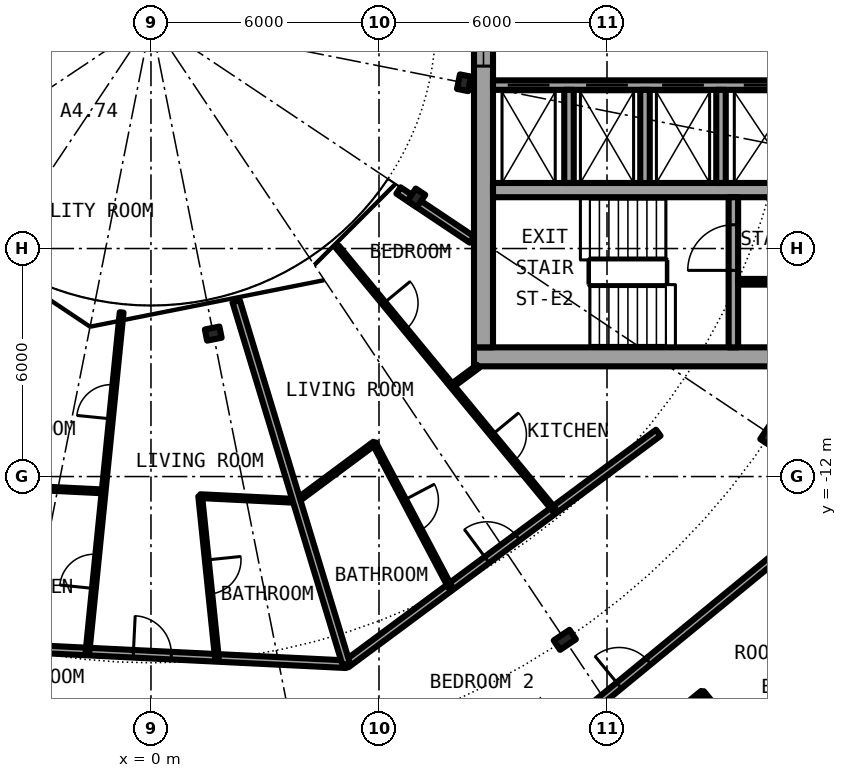
"""IFC4 building model, lengths in metres.
Left out: names, types, materials, properties, quantities, classifications, styles, units other than length and angle.
Written with IfcOpenShell. Run it as: python <this file> out.ifc"""

import sys

from ifc_helpers import new_model, si_unit, direction, frame, frame_2d, origin, origin_2d, place, context, subcontext, project, spatial, rectangle, i_section, extrude, element, fill, save


model = new_model("IFC4")
c1 = context("Model", 3, precision=1e-05, world=origin(), true_north=direction((0.0, 1.0)))
c2 = subcontext(c1, "Body", "Model", "MODEL_VIEW")
j1 = project(units=[si_unit("LENGTHUNIT", "METRE"), si_unit("PLANEANGLEUNIT", "RADIAN")], contexts=[c1])
p1 = place(None, origin())
s1 = spatial("IfcSite", under=j1, at=p1, CompositionType="ELEMENT")
p2 = place(p1, origin())
s2 = spatial("IfcBuilding", under=s1, at=p2, CompositionType="ELEMENT")
p3 = place(p2, frame((0.0, 0.0, 151.3)))
s3 = spatial("IfcBuildingStorey", under=s2, at=p3, CompositionType="ELEMENT", Elevation=151.3)
for number, where, z_axis, x_axis in (
    (1, (10.889, -16.297, 0.0), (0.0, 0.0, 1.0), (0.556, -0.831, 0.0)),
    (2, (16.297, -10.889, 0.0), (0.0, 0.0, 1.0), (0.831, -0.556, 0.0)),
):
    element("IfcColumn", number, at=place(p3, frame(where, z_axis=z_axis, x_axis=x_axis)), inside=s3, PredefinedType="COLUMN", context=c2, shape_type="SweptSolid", body=[
        extrude(i_section(OverallWidth=0.3, OverallDepth=0.5, WebThickness=0.014, FlangeThickness=0.028, FilletRadius=0.027, at=origin_2d()), origin(), (0.0, 0.0, 1.0), 3.05),
    ])
for number, where, z_axis, x_axis in (
    (3, (1.639, -8.239, 0.0), (0.0, 0.0, 1.0), (0.195, -0.981, 0.0)),
    (4, (6.984, -4.667, 0.0), (0.0, 0.0, 1.0), (0.831, -0.556, 0.0)),
    (5, (8.239, -1.639, 0.0), (0.0, 0.0, 1.0), (0.981, -0.195, 0.0)),
):
    element("IfcColumn", number, at=place(p3, frame(where, z_axis=z_axis, x_axis=x_axis)), inside=s3, PredefinedType="COLUMN", context=c2, shape_type="SweptSolid", body=[
        extrude(i_section(OverallWidth=0.3, OverallDepth=0.39, WebThickness=0.011, FlangeThickness=0.019, FilletRadius=0.027, at=origin_2d()), origin(), (0.0, 0.0, 1.0), 3.05),
    ])
p4 = place(p3, frame((8.5, -8.85, 0.0), z_axis=(0.0, 0.0, 1.0), x_axis=(1.0, 0.0, 0.0)))
e6 = element("IfcWall", 6, at=p4, inside=s3, PredefinedType="SHEAR", context=c2, shape_type="SweptSolid", body=[
    extrude(rectangle(XDim=13.6, YDim=0.5, at=frame_2d((6.8, 0.0))), origin(), (0.0, 0.0, 1.0), 3.05),
])
p5 = place(p4, frame((11.375, 0.0, 0.0)))
e7 = element("IfcOpeningElement", 7, at=p5, cuts=e6, PredefinedType="OPENING", context=c2, shape_type="SweptSolid", body=[
    extrude(rectangle(XDim=1.2, YDim=2.3, at=frame_2d((0.6, 1.15))), frame((0.0, 0.26, 0.0), z_axis=(0.0, -1.0, 0.0), x_axis=(1.0, 0.0, 0.0)), (0.0, 0.0, 1.0), 0.52),
])
p6 = place(p3, frame((8.75, -8.6, 0.0), z_axis=(0.0, 0.0, 1.0), x_axis=(0.0, 1.0, 0.0)))
e8 = element("IfcWall", 8, at=p6, inside=s3, PredefinedType="SHEAR", context=c2, shape_type="SweptSolid", body=[
    extrude(rectangle(XDim=17.2, YDim=0.5, at=frame_2d((8.6, 0.0))), origin(), (0.0, 0.0, 1.0), 3.05),
])
p7 = place(p6, frame((7.4, 0.0, 0.1)))
e9 = element("IfcOpeningElement", 9, at=p7, cuts=e8, PredefinedType="OPENING", context=c2, shape_type="SweptSolid", body=[
    extrude(rectangle(XDim=2.4, YDim=2.2, at=frame_2d((1.2, 1.1))), frame((0.0, 0.26, 0.0), z_axis=(0.0, -1.0, 0.0), x_axis=(1.0, 0.0, 0.0)), (0.0, 0.0, 1.0), 0.52),
])
p8 = place(p3, frame((19.15, -1.7, 0.0), z_axis=(0.0, 0.0, 1.0), x_axis=(-1.0, 0.0, 0.0)))
e10 = element("IfcWall", 10, at=p8, inside=s3, PredefinedType="SHEAR", context=c2, shape_type="SweptSolid", body=[
    extrude(rectangle(XDim=10.15, YDim=0.25, at=frame_2d((5.075, 0.0))), origin(), (0.0, 0.0, 1.0), 3.05),
])
p9 = place(p8, frame((8.663, 0.0, 0.0)))
e11 = element("IfcOpeningElement", 11, at=p9, cuts=e10, PredefinedType="OPENING", context=c2, shape_type="SweptSolid", body=[
    extrude(rectangle(XDim=1.1, YDim=2.3, at=frame_2d((0.55, 1.15))), frame((0.0, 0.135, 0.0), z_axis=(0.0, -1.0, 0.0), x_axis=(1.0, 0.0, 0.0)), (0.0, 0.0, 1.0), 0.27),
])
p10 = place(p8, frame((6.6, 0.0, 0.0)))
e12 = element("IfcOpeningElement", 12, at=p10, cuts=e10, PredefinedType="OPENING", context=c2, shape_type="SweptSolid", body=[
    extrude(rectangle(XDim=1.1, YDim=2.3, at=frame_2d((0.55, 1.15))), frame((0.0, 0.135, 0.0), z_axis=(0.0, -1.0, 0.0), x_axis=(1.0, 0.0, 0.0)), (0.0, 0.0, 1.0), 0.27),
])
p11 = place(p8, frame((4.6, 0.0, 0.0)))
e13 = element("IfcOpeningElement", 13, at=p11, cuts=e10, PredefinedType="OPENING", context=c2, shape_type="SweptSolid", body=[
    extrude(rectangle(XDim=1.1, YDim=2.3, at=frame_2d((0.55, 1.15))), frame((0.0, 0.135, 0.0), z_axis=(0.0, -1.0, 0.0), x_axis=(1.0, 0.0, 0.0)), (0.0, 0.0, 1.0), 0.27),
])
p12 = place(p8, frame((2.45, 0.0, 0.0)))
e14 = element("IfcOpeningElement", 14, at=p12, cuts=e10, PredefinedType="OPENING", context=c2, shape_type="SweptSolid", body=[
    extrude(rectangle(XDim=1.1, YDim=2.3, at=frame_2d((0.55, 1.15))), frame((0.0, 0.135, 0.0), z_axis=(0.0, -1.0, 0.0), x_axis=(1.0, 0.0, 0.0)), (0.0, 0.0, 1.0), 0.27),
])
p13 = place(p8, frame((0.413, 0.0, 0.0)))
e15 = element("IfcOpeningElement", 15, at=p13, cuts=e10, PredefinedType="OPENING", context=c2, shape_type="SweptSolid", body=[
    extrude(rectangle(XDim=0.9, YDim=2.3, at=frame_2d((0.45, 1.15))), frame((0.0, 0.135, 0.0), z_axis=(0.0, -1.0, 0.0), x_axis=(1.0, 0.0, 0.0)), (0.0, 0.0, 1.0), 0.27),
])
p14 = place(p3, frame((9.0, -4.462, 0.0), z_axis=(0.0, 0.0, 1.0), x_axis=(1.0, 0.0, 0.0)))
e16 = element("IfcWall", 16, at=p14, inside=s3, PredefinedType="SHEAR", context=c2, shape_type="SweptSolid", body=[
    extrude(rectangle(XDim=10.15, YDim=0.375, at=frame_2d((5.075, 0.0))), origin(), (0.0, 0.0, 1.0), 3.05),
])
p15 = place(p3, frame((15.325, -8.6, 0.0), z_axis=(0.0, 0.0, 1.0), x_axis=(0.0, 1.0, 0.0)))
e17 = element("IfcWall", 17, at=p15, inside=s3, PredefinedType="SHEAR", context=c2, shape_type="SweptSolid", body=[
    extrude(rectangle(XDim=3.95, YDim=0.25, at=frame_2d((1.975, 0.0))), origin(), (0.0, 0.0, 1.0), 3.05),
])
p16 = place(p15, frame((2.025, 0.0, 0.0)))
e18 = element("IfcOpeningElement", 18, at=p16, cuts=e17, PredefinedType="OPENING", context=c2, shape_type="SweptSolid", body=[
    extrude(rectangle(XDim=1.2, YDim=2.3, at=frame_2d((0.6, 1.15))), frame((0.0, 0.135, 0.0), z_axis=(0.0, -1.0, 0.0), x_axis=(1.0, 0.0, 0.0)), (0.0, 0.0, 1.0), 0.27),
])
for number, where, z_axis, x_axis in (
    (19, (15.0, -1.825, 0.0), (0.0, 0.0, 1.0), (0.0, -1.0, 0.0)),
    (20, (11.0, -1.825, 0.0), (0.0, 0.0, 1.0), (0.0, -1.0, 0.0)),
    (21, (13.0, -1.825, 0.0), (0.0, 0.0, 1.0), (0.0, -1.0, 0.0)),
):
    element("IfcWall", number, at=place(p3, frame(where, z_axis=z_axis, x_axis=x_axis)), inside=s3, PredefinedType="SOLIDWALL", context=c2, shape_type="SweptSolid", body=[
        extrude(rectangle(XDim=2.45, YDim=0.25, at=frame_2d((1.225, 0.0))), origin(), (0.0, 0.0, 1.0), 2.7),
    ])
p17 = place(p3, frame((15.45, -6.875, 0.0), z_axis=(0.0, 0.0, 1.0), x_axis=(1.0, 0.0, 0.0)))
e22 = element("IfcWall", 22, at=p17, inside=s3, PredefinedType="PARTITIONING", context=c2, shape_type="SweptSolid", body=[
    extrude(rectangle(XDim=3.7, YDim=0.15, at=frame_2d((1.85, 0.0))), origin(), (0.0, 0.0, 1.0), 2.7),
])
p18 = place(p17, frame((1.4, 0.0, 0.0)))
e23 = element("IfcOpeningElement", 23, at=p18, cuts=e22, PredefinedType="OPENING", context=c2, shape_type="SweptSolid", body=[
    extrude(rectangle(XDim=0.9, YDim=2.3, at=frame_2d((0.45, 1.15))), frame((0.0, 0.085, 0.0), z_axis=(0.0, -1.0, 0.0), x_axis=(1.0, 0.0, 0.0)), (0.0, 0.0, 1.0), 0.17),
])
p19 = place(p3, frame((9.146, -22.081, 0.0), z_axis=(0.0, 0.0, 1.0), x_axis=(0.772956112865, 0.634459492469, 0.0)))
e24 = element("IfcWall", 24, at=p19, inside=s3, PredefinedType="PARTITIONING", context=c2, shape_type="SweptSolid", body=[
    extrude(rectangle(XDim=6.938, YDim=0.1, at=frame_2d((3.469, 0.0))), origin(), (0.0, 0.0, 1.0), 2.7),
])
p20 = place(p19, frame((3.018, 0.0, 0.0)))
e25 = element("IfcOpeningElement", 25, at=p20, cuts=e24, PredefinedType="OPENING", context=c2, shape_type="SweptSolid", body=[
    extrude(rectangle(XDim=0.9, YDim=2.3, at=frame_2d((0.45, 1.15))), frame((0.0, 0.06, 0.0), z_axis=(0.0, -1.0, 0.0), x_axis=(1.0, 0.0, 0.0)), (0.0, 0.0, 1.0), 0.12),
])
p21 = place(p19, frame((0.709, 0.0, 0.0)))
e26 = element("IfcOpeningElement", 26, at=p21, cuts=e24, PredefinedType="OPENING", context=c2, shape_type="SweptSolid", body=[
    extrude(rectangle(XDim=0.9, YDim=2.3, at=frame_2d((0.45, 1.15))), frame((0.0, 0.06, 0.0), z_axis=(0.0, -1.0, 0.0), x_axis=(1.0, 0.0, 0.0)), (0.0, 0.0, 1.0), 0.12),
])
p22 = place(p3, frame((8.534, -20.603, 0.0), z_axis=(0.0, 0.0, 1.0), x_axis=(0.772983503654, 0.634426121056, 0.0)))
e27 = element("IfcWall", 27, at=p22, inside=s3, PredefinedType="PARTITIONING", context=c2, shape_type="SweptSolid", body=[
    extrude(rectangle(XDim=12.947, YDim=0.2, at=frame_2d((6.474, 0.0))), origin(), (0.0, 0.0, 1.0), 2.7),
])
p23 = place(p22, frame((4.895, 0.0, 0.0)))
e28 = element("IfcOpeningElement", 28, at=p23, cuts=e27, PredefinedType="OPENING", context=c2, shape_type="SweptSolid", body=[
    extrude(rectangle(XDim=1.0, YDim=2.3, at=frame_2d((0.5, 1.15))), frame((0.0, 0.11, 0.0), z_axis=(0.0, -1.0, 0.0), x_axis=(1.0, 0.0, 0.0)), (0.0, 0.0, 1.0), 0.22),
])
p24 = place(p3, frame((-6.778, -16.353, 0.0), z_axis=(0.0, 0.0, 1.0), x_axis=(0.998797244, -0.049031269395, 0.0)))
e29 = element("IfcWall", 29, at=p24, inside=s3, PredefinedType="PARTITIONING", context=c2, shape_type="SweptSolid", body=[
    extrude(rectangle(XDim=11.93, YDim=0.2, at=frame_2d((5.965, 0.0))), origin(), (0.0, 0.0, 1.0), 2.7),
])
p25 = place(p24, frame((6.321, 0.0, 0.0)))
e30 = element("IfcOpeningElement", 30, at=p25, cuts=e29, PredefinedType="OPENING", context=c2, shape_type="SweptSolid", body=[
    extrude(rectangle(XDim=1.0, YDim=2.3, at=frame_2d((0.5, 1.15))), frame((0.0, 0.11, 0.0), z_axis=(0.0, -1.0, 0.0), x_axis=(1.0, 0.0, 0.0)), (0.0, 0.0, 1.0), 0.22),
])
p26 = place(p3, frame((5.137, -16.938, 0.0), z_axis=(0.0, 0.0, 1.0), x_axis=(0.803229232922, 0.595670042371, 0.0)))
e31 = element("IfcWall", 31, at=p26, inside=s3, PredefinedType="PARTITIONING", context=c2, shape_type="SweptSolid", body=[
    extrude(rectangle(XDim=10.224, YDim=0.2, at=frame_2d((5.112, 0.0))), origin(), (0.0, 0.0, 1.0), 2.7),
])
p27 = place(p26, frame((4.612, 0.0, 0.0)))
e32 = element("IfcOpeningElement", 32, at=p27, cuts=e31, PredefinedType="OPENING", context=c2, shape_type="SweptSolid", body=[
    extrude(rectangle(XDim=1.0, YDim=2.3, at=frame_2d((0.5, 1.15))), frame((0.0, 0.11, 0.0), z_axis=(0.0, -1.0, 0.0), x_axis=(1.0, 0.0, 0.0)), (0.0, 0.0, 1.0), 0.22),
])
p28 = place(p3, frame((-5.06, -12.203, 0.0), z_axis=(0.0, 0.0, 1.0), x_axis=(0.998784958727, -0.049280891026, 0.0)))
e33 = element("IfcWall", 33, at=p28, inside=s3, PredefinedType="PARTITIONING", context=c2, shape_type="SweptSolid", body=[
    extrude(rectangle(XDim=3.82, YDim=0.1, at=frame_2d((1.91, 0.0))), origin(), (0.0, 0.0, 1.0), 2.7),
])
p29 = place(p3, frame((1.295, -12.516, 0.0), z_axis=(0.0, 0.0, 1.0), x_axis=(0.998790364054, -0.049171217923, 0.0)))
e34 = element("IfcWall", 34, at=p29, inside=s3, PredefinedType="PARTITIONING", context=c2, shape_type="SweptSolid", body=[
    extrude(rectangle(XDim=2.542, YDim=0.1, at=frame_2d((1.271, 0.0))), origin(), (0.0, 0.0, 1.0), 2.7),
])
p30 = place(p3, frame((3.835, -12.64, 0.0), z_axis=(0.0, 0.0, 1.0), x_axis=(0.803259509791, 0.595629213463, 0.0)))
e35 = element("IfcWall", 35, at=p30, inside=s3, PredefinedType="PARTITIONING", context=c2, shape_type="SweptSolid", body=[
    extrude(rectangle(XDim=2.543, YDim=0.1, at=frame_2d((1.272, 0.0))), origin(), (0.0, 0.0, 1.0), 2.7),
])
p31 = place(p3, frame((7.919, -9.611, 0.0), z_axis=(0.0, 0.0, 1.0), x_axis=(0.803199066515, 0.595710718007, 0.0)))
e36 = element("IfcWall", 36, at=p31, inside=s3, PredefinedType="PARTITIONING", context=c2, shape_type="SweptSolid", body=[
    extrude(rectangle(XDim=0.858, YDim=0.1, at=frame_2d((0.429, 0.0))), origin(), (0.0, 0.0, 1.0), 2.7),
])
p32 = place(p3, frame((6.513, -4.472, 0.0), z_axis=(0.0, 0.0, 1.0), x_axis=(0.83133816625, -0.555766905579, 0.0)))
e37 = element("IfcWall", 37, at=p32, inside=s3, PredefinedType="PARTITIONING", context=c2, shape_type="SweptSolid", body=[
    extrude(rectangle(XDim=2.323, YDim=0.2, at=frame_2d((1.162, 0.0))), origin(), (0.0, 0.0, 1.0), 2.7),
])
p33 = place(p3, frame((-1.669, -16.603, 0.0), z_axis=(0.0, 0.0, 1.0), x_axis=(0.100029361081, 0.994984485769, 0.0)))
e38 = element("IfcWall", 38, at=p33, inside=s3, PredefinedType="PARTITIONING", context=c2, shape_type="SweptSolid", body=[
    extrude(rectangle(XDim=8.967, YDim=0.1, at=frame_2d((4.483, 0.0))), origin(), (0.0, 0.0, 1.0), 2.7),
])
p34 = place(p33, frame((1.667, 0.0, 0.0)))
e39 = element("IfcOpeningElement", 39, at=p34, cuts=e38, PredefinedType="OPENING", context=c2, shape_type="SweptSolid", body=[
    extrude(rectangle(XDim=0.9, YDim=2.3, at=frame_2d((0.45, 1.15))), frame((0.0, 0.06, 0.0), z_axis=(0.0, -1.0, 0.0), x_axis=(1.0, 0.0, 0.0)), (0.0, 0.0, 1.0), 0.12),
])
p35 = place(p33, frame((6.152, 0.0, 0.0)))
e40 = element("IfcOpeningElement", 40, at=p35, cuts=e38, PredefinedType="OPENING", context=c2, shape_type="SweptSolid", body=[
    extrude(rectangle(XDim=0.9, YDim=2.3, at=frame_2d((0.45, 1.15))), frame((0.0, 0.06, 0.0), z_axis=(0.0, -1.0, 0.0), x_axis=(1.0, 0.0, 0.0)), (0.0, 0.0, 1.0), 0.12),
])
p36 = place(p3, frame((1.295, -12.515, 0.0), z_axis=(0.0, 0.0, 1.0), x_axis=(0.102875790791, -0.994694210131, 0.0)))
e41 = element("IfcWall", 41, at=p36, inside=s3, PredefinedType="PARTITIONING", context=c2, shape_type="SweptSolid", body=[
    extrude(rectangle(XDim=4.279, YDim=0.1, at=frame_2d((2.139, 0.0))), origin(), (0.0, 0.0, 1.0), 2.7),
])
p37 = place(p36, frame((1.689, 0.0, 0.0)))
e42 = element("IfcOpeningElement", 42, at=p37, cuts=e41, PredefinedType="OPENING", context=c2, shape_type="SweptSolid", body=[
    extrude(rectangle(XDim=0.9, YDim=2.3, at=frame_2d((0.45, 1.15))), frame((0.0, 0.06, 0.0), z_axis=(0.0, -1.0, 0.0), x_axis=(1.0, 0.0, 0.0)), (0.0, 0.0, 1.0), 0.12),
])
p38 = place(p3, frame((2.241, -7.388, 0.0), z_axis=(0.0, 0.0, 1.0), x_axis=(0.290284403441, -0.956940418793, 0.0)))
e43 = element("IfcWall", 43, at=p38, inside=s3, PredefinedType="PARTITIONING", context=c2, shape_type="SweptSolid", body=[
    extrude(rectangle(XDim=9.98, YDim=0.2, at=frame_2d((4.99, 0.0))), origin(), (0.0, 0.0, 1.0), 2.7),
])
p39 = place(p3, frame((4.908, -5.959, 0.0), z_axis=(0.0, 0.0, 1.0), x_axis=(0.636115614725, -0.771593756262, 0.0)))
e44 = element("IfcWall", 44, at=p39, inside=s3, PredefinedType="PARTITIONING", context=c2, shape_type="SweptSolid", body=[
    extrude(rectangle(XDim=8.967, YDim=0.1, at=frame_2d((4.483, 0.0))), origin(), (0.0, 0.0, 1.0), 2.7),
])
p40 = place(p39, frame((6.4, 0.0, 0.0)))
e45 = element("IfcOpeningElement", 45, at=p40, cuts=e44, PredefinedType="OPENING", context=c2, shape_type="SweptSolid", body=[
    extrude(rectangle(XDim=0.9, YDim=2.3, at=frame_2d((0.45, 1.15))), frame((0.0, 0.06, 0.0), z_axis=(0.0, -1.0, 0.0), x_axis=(1.0, 0.0, 0.0)), (0.0, 0.0, 1.0), 0.12),
])
p41 = place(p39, frame((1.917, 0.0, 0.0)))
e46 = element("IfcOpeningElement", 46, at=p41, cuts=e44, PredefinedType="OPENING", context=c2, shape_type="SweptSolid", body=[
    extrude(rectangle(XDim=0.9, YDim=2.3, at=frame_2d((0.45, 1.15))), frame((0.0, 0.06, 0.0), z_axis=(0.0, -1.0, 0.0), x_axis=(1.0, 0.0, 0.0)), (0.0, 0.0, 1.0), 0.12),
])
p42 = place(p3, frame((5.875, -11.126, 0.0), z_axis=(0.0, 0.0, 1.0), x_axis=(0.467030118529, -0.884241408432, 0.0)))
e47 = element("IfcWall", 47, at=p42, inside=s3, PredefinedType="PARTITIONING", context=c2, shape_type="SweptSolid", body=[
    extrude(rectangle(XDim=4.278, YDim=0.1, at=frame_2d((2.139, 0.0))), origin(), (0.0, 0.0, 1.0), 2.7),
])
p43 = place(p42, frame((1.689, 0.0, 0.0)))
e48 = element("IfcOpeningElement", 48, at=p43, cuts=e47, PredefinedType="OPENING", context=c2, shape_type="SweptSolid", body=[
    extrude(rectangle(XDim=0.9, YDim=2.3, at=frame_2d((0.45, 1.15))), frame((0.0, 0.06, 0.0), z_axis=(0.0, -1.0, 0.0), x_axis=(1.0, 0.0, 0.0)), (0.0, 0.0, 1.0), 0.12),
])
p44 = place(p3, frame((14.509, -17.679, 0.0), z_axis=(0.0, 0.0, 1.0), x_axis=(0.634342681687, -0.77305197897, 0.0)))
e49 = element("IfcWall", 49, at=p44, inside=s3, PredefinedType="PARTITIONING", context=c2, shape_type="SweptSolid", body=[
    extrude(rectangle(XDim=4.305, YDim=0.1, at=frame_2d((2.153, 0.0))), origin(), (0.0, 0.0, 1.0), 2.7),
])
p45 = place(p44, frame((1.703, 0.0, 0.0)))
e50 = element("IfcOpeningElement", 50, at=p45, cuts=e49, PredefinedType="OPENING", context=c2, shape_type="SweptSolid", body=[
    extrude(rectangle(XDim=0.9, YDim=2.3, at=frame_2d((0.45, 1.15))), frame((0.0, 0.06, 0.0), z_axis=(0.0, -1.0, 0.0), x_axis=(1.0, 0.0, 0.0)), (0.0, 0.0, 1.0), 0.12),
])
p46 = place(p9, origin())
e51 = element("IfcDoor", 51, at=p46, inside=s3, OperationType="DOUBLE_DOOR_SLIDING", PredefinedType="DOOR", context=c2, shape_type="SweptSolid", body=[
    extrude(rectangle(XDim=1.1, YDim=2.3, at=frame_2d((0.55, 1.15))), frame((0.0, 0.025, 0.0), z_axis=(0.0, -1.0, 0.0), x_axis=(1.0, 0.0, 0.0)), (0.0, 0.0, 1.0), 0.05),
])
fill(e11, e51)
p47 = place(p10, origin())
e52 = element("IfcDoor", 52, at=p47, inside=s3, OperationType="DOUBLE_DOOR_SLIDING", PredefinedType="DOOR", context=c2, shape_type="SweptSolid", body=[
    extrude(rectangle(XDim=1.1, YDim=2.3, at=frame_2d((0.55, 1.15))), frame((0.0, 0.025, 0.0), z_axis=(0.0, -1.0, 0.0), x_axis=(1.0, 0.0, 0.0)), (0.0, 0.0, 1.0), 0.05),
])
fill(e12, e52)
p48 = place(p11, origin())
e53 = element("IfcDoor", 53, at=p48, inside=s3, OperationType="DOUBLE_DOOR_SLIDING", PredefinedType="DOOR", context=c2, shape_type="SweptSolid", body=[
    extrude(rectangle(XDim=1.1, YDim=2.3, at=frame_2d((0.55, 1.15))), frame((0.0, 0.025, 0.0), z_axis=(0.0, -1.0, 0.0), x_axis=(1.0, 0.0, 0.0)), (0.0, 0.0, 1.0), 0.05),
])
fill(e13, e53)
p49 = place(p12, origin())
e54 = element("IfcDoor", 54, at=p49, inside=s3, OperationType="DOUBLE_DOOR_SLIDING", PredefinedType="DOOR", context=c2, shape_type="SweptSolid", body=[
    extrude(rectangle(XDim=1.1, YDim=2.3, at=frame_2d((0.55, 1.15))), frame((0.0, 0.025, 0.0), z_axis=(0.0, -1.0, 0.0), x_axis=(1.0, 0.0, 0.0)), (0.0, 0.0, 1.0), 0.05),
])
fill(e14, e54)
p50 = place(p16, origin())
e55 = element("IfcDoor", 55, at=p50, inside=s3, OperationType="SINGLE_SWING_LEFT", PredefinedType="DOOR", context=c2, shape_type="SweptSolid", body=[
    extrude(rectangle(XDim=1.2, YDim=2.3, at=frame_2d((0.6, 1.15))), frame((0.0, 0.025, 0.0), z_axis=(0.0, -1.0, 0.0), x_axis=(1.0, 0.0, 0.0)), (0.0, 0.0, 1.0), 0.05),
])
fill(e18, e55)
p51 = place(p7, origin())
e56 = element("IfcWindow", 56, at=p51, inside=s3, PartitioningType="SINGLE_PANEL", PredefinedType="WINDOW", context=c2, shape_type="SweptSolid", body=[
    extrude(rectangle(XDim=2.4, YDim=2.2, at=frame_2d((1.2, 1.1))), frame((0.0, 0.03, 0.0), z_axis=(0.0, -1.0, 0.0), x_axis=(1.0, 0.0, 0.0)), (0.0, 0.0, 1.0), 0.06),
])
fill(e9, e56)
p52 = place(p23, origin())
e57 = element("IfcDoor", 57, at=p52, inside=s3, OperationType="SINGLE_SWING_LEFT", PredefinedType="DOOR", context=c2, shape_type="SweptSolid", body=[
    extrude(rectangle(XDim=1.0, YDim=2.3, at=frame_2d((0.5, 1.15))), frame((0.0, 0.025, 0.0), z_axis=(0.0, -1.0, 0.0), x_axis=(1.0, 0.0, 0.0)), (0.0, 0.0, 1.0), 0.05),
])
fill(e28, e57)
p53 = place(p25, origin())
e58 = element("IfcDoor", 58, at=p53, inside=s3, OperationType="SINGLE_SWING_RIGHT", PredefinedType="DOOR", context=c2, shape_type="SweptSolid", body=[
    extrude(rectangle(XDim=1.0, YDim=2.3, at=frame_2d((0.5, 1.15))), frame((0.0, 0.025, 0.0), z_axis=(0.0, -1.0, 0.0), x_axis=(1.0, 0.0, 0.0)), (0.0, 0.0, 1.0), 0.05),
])
fill(e30, e58)
p54 = place(p37, origin())
e59 = element("IfcDoor", 59, at=p54, inside=s3, OperationType="SINGLE_SWING_RIGHT", PredefinedType="DOOR", context=c2, shape_type="SweptSolid", body=[
    extrude(rectangle(XDim=0.9, YDim=2.3, at=frame_2d((0.45, 1.15))), frame((0.0, 0.025, 0.0), z_axis=(0.0, -1.0, 0.0), x_axis=(1.0, 0.0, 0.0)), (0.0, 0.0, 1.0), 0.05),
])
fill(e42, e59)
p55 = place(p34, origin())
e60 = element("IfcDoor", 60, at=p55, inside=s3, OperationType="SINGLE_SWING_LEFT", PredefinedType="DOOR", context=c2, shape_type="SweptSolid", body=[
    extrude(rectangle(XDim=0.9, YDim=2.3, at=frame_2d((0.45, 1.15))), frame((0.0, 0.025, 0.0), z_axis=(0.0, -1.0, 0.0), x_axis=(1.0, 0.0, 0.0)), (0.0, 0.0, 1.0), 0.05),
])
fill(e39, e60)
p56 = place(p35, origin())
e61 = element("IfcDoor", 61, at=p56, inside=s3, OperationType="SINGLE_SWING_RIGHT", PredefinedType="DOOR", context=c2, shape_type="SweptSolid", body=[
    extrude(rectangle(XDim=0.9, YDim=2.3, at=frame_2d((0.45, 1.15))), frame((0.0, 0.025, 0.0), z_axis=(0.0, -1.0, 0.0), x_axis=(1.0, 0.0, 0.0)), (0.0, 0.0, 1.0), 0.05),
])
fill(e40, e61)
p57 = place(p27, origin())
e62 = element("IfcDoor", 62, at=p57, inside=s3, OperationType="SINGLE_SWING_RIGHT", PredefinedType="DOOR", context=c2, shape_type="SweptSolid", body=[
    extrude(rectangle(XDim=1.0, YDim=2.3, at=frame_2d((0.5, 1.15))), frame((0.0, 0.025, 0.0), z_axis=(0.0, -1.0, 0.0), x_axis=(1.0, 0.0, 0.0)), (0.0, 0.0, 1.0), 0.05),
])
fill(e32, e62)
p58 = place(p43, origin())
e63 = element("IfcDoor", 63, at=p58, inside=s3, OperationType="SINGLE_SWING_RIGHT", PredefinedType="DOOR", context=c2, shape_type="SweptSolid", body=[
    extrude(rectangle(XDim=0.9, YDim=2.3, at=frame_2d((0.45, 1.15))), frame((0.0, 0.025, 0.0), z_axis=(0.0, -1.0, 0.0), x_axis=(1.0, 0.0, 0.0)), (0.0, 0.0, 1.0), 0.05),
])
fill(e48, e63)
p59 = place(p40, origin())
e64 = element("IfcDoor", 64, at=p59, inside=s3, OperationType="SINGLE_SWING_RIGHT", PredefinedType="DOOR", context=c2, shape_type="SweptSolid", body=[
    extrude(rectangle(XDim=0.9, YDim=2.3, at=frame_2d((0.45, 1.15))), frame((0.0, 0.025, 0.0), z_axis=(0.0, -1.0, 0.0), x_axis=(1.0, 0.0, 0.0)), (0.0, 0.0, 1.0), 0.05),
])
fill(e45, e64)
p60 = place(p41, origin())
e65 = element("IfcDoor", 65, at=p60, inside=s3, OperationType="SINGLE_SWING_LEFT", PredefinedType="DOOR", context=c2, shape_type="SweptSolid", body=[
    extrude(rectangle(XDim=0.9, YDim=2.3, at=frame_2d((0.45, 1.15))), frame((0.0, 0.025, 0.0), z_axis=(0.0, -1.0, 0.0), x_axis=(1.0, 0.0, 0.0)), (0.0, 0.0, 1.0), 0.05),
])
fill(e46, e65)
save(model, sys.argv[1])
